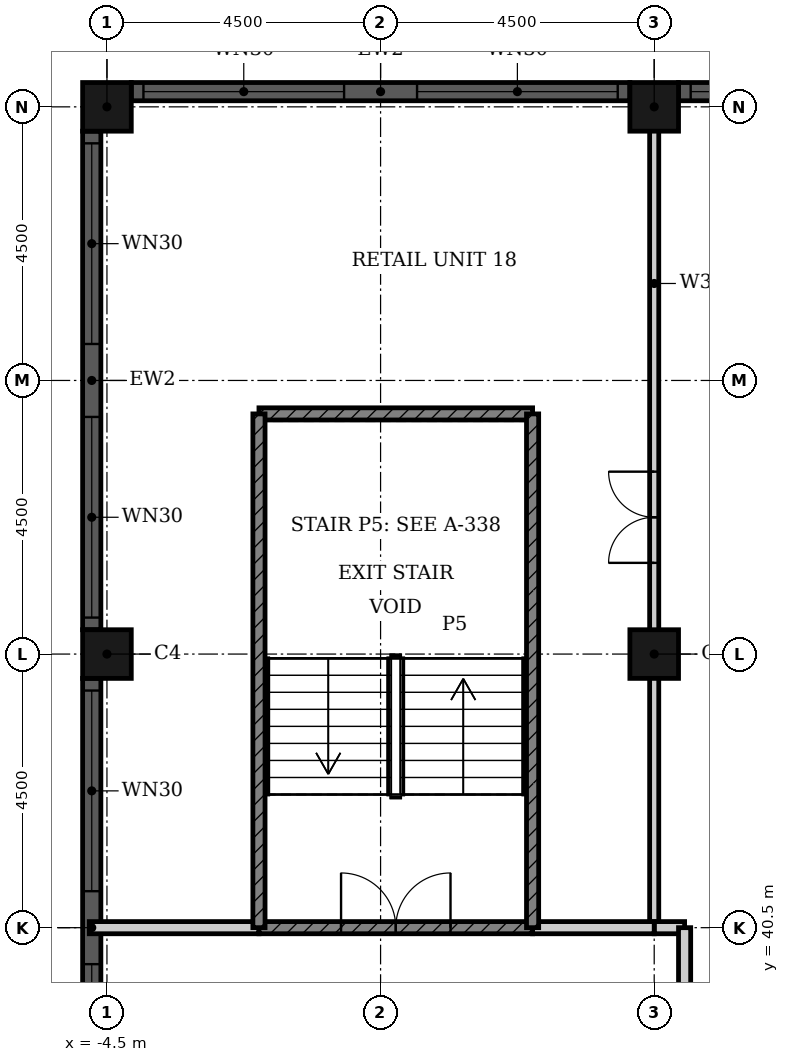
"""IFC4 building model, lengths in metres.
Left out: names, types, materials, properties, quantities, classifications, styles, units other than length and angle.
Written with IfcOpenShell. Run it as: python <this file> out.ifc"""

import sys

from ifc_helpers import new_model, si_unit, direction, frame, frame_2d, origin, origin_2d, place, context, subcontext, project, spatial, rectangle, hollow_rectangle, extrude, element, fill, save


model = new_model("IFC4")
c1 = context("Model", 3, precision=1e-05, world=origin(), true_north=direction((0.0, 1.0)))
c2 = subcontext(c1, "Body", "Model", "MODEL_VIEW")
j1 = project(units=[si_unit("LENGTHUNIT", "METRE"), si_unit("PLANEANGLEUNIT", "RADIAN")], contexts=[c1])
p1 = place(None, origin())
s1 = spatial("IfcSite", under=j1, at=p1, CompositionType="ELEMENT")
p2 = place(p1, origin())
s2 = spatial("IfcBuilding", under=s1, at=p2, CompositionType="ELEMENT")
p3 = place(p2, frame((0.0, 0.0, 6.6)))
s3 = spatial("IfcBuildingStorey", under=s2, at=p3, CompositionType="ELEMENT", Elevation=6.6)
for number, where, z_axis, x_axis in (
    (1, (-4.5, 45.0, 0.0), (0.0, 0.0, 1.0), (1.0, 0.0, 0.0)),
    (2, (-4.5, 54.0, 0.0), (0.0, 0.0, 1.0), (1.0, 0.0, 0.0)),
    (3, (4.5, 54.0, 0.0), (0.0, 0.0, 1.0), (1.0, 0.0, 0.0)),
    (4, (4.5, 45.0, 0.0), (0.0, 0.0, 1.0), (1.0, 0.0, 0.0)),
):
    element("IfcColumn", number, at=place(p3, frame(where, z_axis=z_axis, x_axis=x_axis)), inside=s3, PredefinedType="COLUMN", context=c2, shape_type="SweptSolid", body=[
        extrude(hollow_rectangle(XDim=0.8, YDim=0.8, WallThickness=0.025, at=origin_2d()), origin(), (0.0, 0.0, 1.0), 5.4),
    ])
p4 = place(p3, frame((13.1, 54.25, 0.0), z_axis=(0.0, 0.0, 1.0), x_axis=(-1.0, 0.0, 0.0)))
e5 = element("IfcWall", 5, at=p4, inside=s3, PredefinedType="SOLIDWALL", context=c2, shape_type="SweptSolid", body=[
    extrude(rectangle(XDim=8.2, YDim=0.3, at=frame_2d((4.1, 0.0))), origin(), (0.0, 0.0, 1.0), 5.4),
])
p5 = place(p4, frame((0.2, 0.0, 0.9)))
e6 = element("IfcOpeningElement", 6, at=p5, cuts=e5, PredefinedType="OPENING", context=c2, shape_type="SweptSolid", body=[
    extrude(rectangle(XDim=3.3, YDim=3.5, at=frame_2d((1.65, 1.75))), frame((0.0, 0.16, 0.0), z_axis=(0.0, -1.0, 0.0), x_axis=(1.0, 0.0, 0.0)), (0.0, 0.0, 1.0), 0.32),
])
p6 = place(p4, frame((4.7, 0.0, 0.9)))
e7 = element("IfcOpeningElement", 7, at=p6, cuts=e5, PredefinedType="OPENING", context=c2, shape_type="SweptSolid", body=[
    extrude(rectangle(XDim=3.3, YDim=3.5, at=frame_2d((1.65, 1.75))), frame((0.0, 0.16, 0.0), z_axis=(0.0, -1.0, 0.0), x_axis=(1.0, 0.0, 0.0)), (0.0, 0.0, 1.0), 0.32),
])
p7 = place(p3, frame((4.1, 54.25, 0.0), z_axis=(0.0, 0.0, 1.0), x_axis=(-1.0, 0.0, 0.0)))
e8 = element("IfcWall", 8, at=p7, inside=s3, PredefinedType="SOLIDWALL", context=c2, shape_type="SweptSolid", body=[
    extrude(rectangle(XDim=8.2, YDim=0.3, at=frame_2d((4.1, 0.0))), origin(), (0.0, 0.0, 1.0), 5.4),
])
p8 = place(p7, frame((0.2, 0.0, 0.9)))
e9 = element("IfcOpeningElement", 9, at=p8, cuts=e8, PredefinedType="OPENING", context=c2, shape_type="SweptSolid", body=[
    extrude(rectangle(XDim=3.3, YDim=3.5, at=frame_2d((1.65, 1.75))), frame((0.0, 0.16, 0.0), z_axis=(0.0, -1.0, 0.0), x_axis=(1.0, 0.0, 0.0)), (0.0, 0.0, 1.0), 0.32),
])
p9 = place(p7, frame((4.7, 0.0, 0.9)))
e10 = element("IfcOpeningElement", 10, at=p9, cuts=e8, PredefinedType="OPENING", context=c2, shape_type="SweptSolid", body=[
    extrude(rectangle(XDim=3.3, YDim=3.5, at=frame_2d((1.65, 1.75))), frame((0.0, 0.16, 0.0), z_axis=(0.0, -1.0, 0.0), x_axis=(1.0, 0.0, 0.0)), (0.0, 0.0, 1.0), 0.32),
])
p10 = place(p3, frame((-4.75, 53.6, 0.0), z_axis=(0.0, 0.0, 1.0), x_axis=(0.0, -1.0, 0.0)))
e11 = element("IfcWall", 11, at=p10, inside=s3, PredefinedType="SOLIDWALL", context=c2, shape_type="SweptSolid", body=[
    extrude(rectangle(XDim=8.2, YDim=0.3, at=frame_2d((4.1, 0.0))), origin(), (0.0, 0.0, 1.0), 5.4),
])
p11 = place(p10, frame((0.2, 0.0, 0.9)))
e12 = element("IfcOpeningElement", 12, at=p11, cuts=e11, PredefinedType="OPENING", context=c2, shape_type="SweptSolid", body=[
    extrude(rectangle(XDim=3.3, YDim=3.5, at=frame_2d((1.65, 1.75))), frame((0.0, 0.16, 0.0), z_axis=(0.0, -1.0, 0.0), x_axis=(1.0, 0.0, 0.0)), (0.0, 0.0, 1.0), 0.32),
])
p12 = place(p10, frame((4.7, 0.0, 0.9)))
e13 = element("IfcOpeningElement", 13, at=p12, cuts=e11, PredefinedType="OPENING", context=c2, shape_type="SweptSolid", body=[
    extrude(rectangle(XDim=3.3, YDim=3.5, at=frame_2d((1.65, 1.75))), frame((0.0, 0.16, 0.0), z_axis=(0.0, -1.0, 0.0), x_axis=(1.0, 0.0, 0.0)), (0.0, 0.0, 1.0), 0.32),
])
p13 = place(p3, frame((-4.75, 44.6, 0.0), z_axis=(0.0, 0.0, 1.0), x_axis=(0.0, -1.0, 0.0)))
e14 = element("IfcWall", 14, at=p13, inside=s3, PredefinedType="SOLIDWALL", context=c2, shape_type="SweptSolid", body=[
    extrude(rectangle(XDim=8.2, YDim=0.3, at=frame_2d((4.1, 0.0))), origin(), (0.0, 0.0, 1.0), 5.4),
])
p14 = place(p13, frame((0.2, 0.0, 0.9)))
e15 = element("IfcOpeningElement", 15, at=p14, cuts=e14, PredefinedType="OPENING", context=c2, shape_type="SweptSolid", body=[
    extrude(rectangle(XDim=3.3, YDim=3.5, at=frame_2d((1.65, 1.75))), frame((0.0, 0.16, 0.0), z_axis=(0.0, -1.0, 0.0), x_axis=(1.0, 0.0, 0.0)), (0.0, 0.0, 1.0), 0.32),
])
p15 = place(p13, frame((4.7, 0.0, 0.9)))
e16 = element("IfcOpeningElement", 16, at=p15, cuts=e14, PredefinedType="OPENING", context=c2, shape_type="SweptSolid", body=[
    extrude(rectangle(XDim=3.3, YDim=3.5, at=frame_2d((1.65, 1.75))), frame((0.0, 0.16, 0.0), z_axis=(0.0, -1.0, 0.0), x_axis=(1.0, 0.0, 0.0)), (0.0, 0.0, 1.0), 0.32),
])
p16 = place(p3, frame((4.5, 40.5, 0.0), z_axis=(0.0, 0.0, 1.0), x_axis=(0.0, 1.0, 0.0)))
e17 = element("IfcWall", 17, at=p16, inside=s3, PredefinedType="PARTITIONING", context=c2, shape_type="SweptSolid", body=[
    extrude(rectangle(XDim=13.69, YDim=0.15, at=frame_2d((6.845, 0.0))), origin(), (0.0, 0.0, 1.0), 5.05),
])
p17 = place(p16, frame((6.0, 0.0, 0.0)))
e18 = element("IfcOpeningElement", 18, at=p17, cuts=e17, PredefinedType="OPENING", context=c2, shape_type="SweptSolid", body=[
    extrude(rectangle(XDim=1.5, YDim=2.4, at=frame_2d((0.75, 1.2))), frame((0.0, 0.085, 0.0), z_axis=(0.0, -1.0, 0.0), x_axis=(1.0, 0.0, 0.0)), (0.0, 0.0, 1.0), 0.17),
])
p18 = place(p3, frame((4.5, 40.5, 0.0), z_axis=(0.0, 0.0, 1.0), x_axis=(1.0, 0.0, 0.0)))
e19 = element("IfcWall", 19, at=p18, inside=s3, PredefinedType="PARTITIONING", context=c2, shape_type="SweptSolid", body=[
    extrude(rectangle(XDim=0.5, YDim=0.2, at=frame_2d((0.25, 0.0))), origin(), (0.0, 0.0, 1.0), 5.05),
])
p19 = place(p3, frame((-4.79, 40.5, 0.0), z_axis=(0.0, 0.0, 1.0), x_axis=(1.0, 0.0, 0.0)))
e20 = element("IfcWall", 20, at=p19, inside=s3, PredefinedType="PARTITIONING", context=c2, shape_type="SweptSolid", body=[
    extrude(rectangle(XDim=2.79, YDim=0.2, at=frame_2d((1.395, 0.0))), origin(), (0.0, 0.0, 1.0), 5.05),
])
p20 = place(p3, frame((2.5, 40.5, 0.0), z_axis=(0.0, 0.0, 1.0), x_axis=(1.0, 0.0, 0.0)))
e21 = element("IfcWall", 21, at=p20, inside=s3, PredefinedType="PARTITIONING", context=c2, shape_type="SweptSolid", body=[
    extrude(rectangle(XDim=2.0, YDim=0.2, at=frame_2d((1.0, 0.0))), origin(), (0.0, 0.0, 1.0), 5.05),
])
p21 = place(p3, frame((5.0, 37.5, 0.0), z_axis=(0.0, 0.0, 1.0), x_axis=(0.0, 1.0, 0.0)))
e22 = element("IfcWall", 22, at=p21, inside=s3, PredefinedType="PARTITIONING", context=c2, shape_type="SweptSolid", body=[
    extrude(rectangle(XDim=3.0, YDim=0.2, at=frame_2d((1.5, 0.0))), origin(), (0.0, 0.0, 1.0), 5.05),
])
p22 = place(p3, frame((-2.0, 40.5, 0.0), z_axis=(0.0, 0.0, 1.0), x_axis=(1.0, 0.0, 0.0)))
e23 = element("IfcWall", 23, at=p22, inside=s3, PredefinedType="SHEAR", context=c2, shape_type="SweptSolid", body=[
    extrude(rectangle(XDim=4.5, YDim=0.2, at=frame_2d((2.25, 0.0))), origin(), (0.0, 0.0, 1.0), 5.05),
])
p23 = place(p22, frame((1.35, 0.0, 0.0)))
e24 = element("IfcOpeningElement", 24, at=p23, cuts=e23, PredefinedType="OPENING", context=c2, shape_type="SweptSolid", body=[
    extrude(rectangle(XDim=1.8, YDim=2.1, at=frame_2d((0.9, 1.05))), frame((0.0, 0.11, 0.0), z_axis=(0.0, -1.0, 0.0), x_axis=(1.0, 0.0, 0.0)), (0.0, 0.0, 1.0), 0.22),
])
p24 = place(p3, frame((-2.0, 48.95, 0.0), z_axis=(0.0, 0.0, 1.0), x_axis=(1.0, 0.0, 0.0)))
e25 = element("IfcWall", 25, at=p24, inside=s3, PredefinedType="SHEAR", context=c2, shape_type="SweptSolid", body=[
    extrude(rectangle(XDim=4.5, YDim=0.2, at=frame_2d((2.25, 0.0))), origin(), (0.0, 0.0, 1.0), 5.05),
])
for number, where, z_axis, x_axis in (
    (26, (-2.0, 40.5, 0.0), (0.0, 0.0, 1.0), (0.0, 1.0, 0.0)),
    (27, (2.5, 40.5, 0.0), (0.0, 0.0, 1.0), (0.0, 1.0, 0.0)),
):
    element("IfcWall", number, at=place(p3, frame(where, z_axis=z_axis, x_axis=x_axis)), inside=s3, PredefinedType="SHEAR", context=c2, shape_type="SweptSolid", body=[
        extrude(rectangle(XDim=8.45, YDim=0.2, at=frame_2d((4.225, 0.0))), origin(), (0.0, 0.0, 1.0), 5.05),
    ])
p25 = place(p6, origin())
e28 = element("IfcWindow", 28, at=p25, inside=s3, PartitioningType="SINGLE_PANEL", PredefinedType="WINDOW", context=c2, shape_type="SweptSolid", body=[
    extrude(rectangle(XDim=3.3, YDim=3.5, at=frame_2d((1.65, 1.75))), frame((0.0, 0.03, 0.0), z_axis=(0.0, -1.0, 0.0), x_axis=(1.0, 0.0, 0.0)), (0.0, 0.0, 1.0), 0.06),
])
fill(e7, e28)
p26 = place(p8, origin())
e29 = element("IfcWindow", 29, at=p26, inside=s3, PartitioningType="SINGLE_PANEL", PredefinedType="WINDOW", context=c2, shape_type="SweptSolid", body=[
    extrude(rectangle(XDim=3.3, YDim=3.5, at=frame_2d((1.65, 1.75))), frame((0.0, 0.03, 0.0), z_axis=(0.0, -1.0, 0.0), x_axis=(1.0, 0.0, 0.0)), (0.0, 0.0, 1.0), 0.06),
])
fill(e9, e29)
p27 = place(p9, origin())
e30 = element("IfcWindow", 30, at=p27, inside=s3, PartitioningType="SINGLE_PANEL", PredefinedType="WINDOW", context=c2, shape_type="SweptSolid", body=[
    extrude(rectangle(XDim=3.3, YDim=3.5, at=frame_2d((1.65, 1.75))), frame((0.0, 0.03, 0.0), z_axis=(0.0, -1.0, 0.0), x_axis=(1.0, 0.0, 0.0)), (0.0, 0.0, 1.0), 0.06),
])
fill(e10, e30)
p28 = place(p11, origin())
e31 = element("IfcWindow", 31, at=p28, inside=s3, PartitioningType="SINGLE_PANEL", PredefinedType="WINDOW", context=c2, shape_type="SweptSolid", body=[
    extrude(rectangle(XDim=3.3, YDim=3.5, at=frame_2d((1.65, 1.75))), frame((0.0, 0.03, 0.0), z_axis=(0.0, -1.0, 0.0), x_axis=(1.0, 0.0, 0.0)), (0.0, 0.0, 1.0), 0.06),
])
fill(e12, e31)
p29 = place(p12, origin())
e32 = element("IfcWindow", 32, at=p29, inside=s3, PartitioningType="SINGLE_PANEL", PredefinedType="WINDOW", context=c2, shape_type="SweptSolid", body=[
    extrude(rectangle(XDim=3.3, YDim=3.5, at=frame_2d((1.65, 1.75))), frame((0.0, 0.03, 0.0), z_axis=(0.0, -1.0, 0.0), x_axis=(1.0, 0.0, 0.0)), (0.0, 0.0, 1.0), 0.06),
])
fill(e13, e32)
p30 = place(p14, origin())
e33 = element("IfcWindow", 33, at=p30, inside=s3, PartitioningType="SINGLE_PANEL", PredefinedType="WINDOW", context=c2, shape_type="SweptSolid", body=[
    extrude(rectangle(XDim=3.3, YDim=3.5, at=frame_2d((1.65, 1.75))), frame((0.0, 0.03, 0.0), z_axis=(0.0, -1.0, 0.0), x_axis=(1.0, 0.0, 0.0)), (0.0, 0.0, 1.0), 0.06),
])
fill(e15, e33)
p31 = place(p15, origin())
e34 = element("IfcWindow", 34, at=p31, inside=s3, PartitioningType="SINGLE_PANEL", PredefinedType="WINDOW", context=c2, shape_type="SweptSolid", body=[
    extrude(rectangle(XDim=3.3, YDim=3.5, at=frame_2d((1.65, 1.75))), frame((0.0, 0.03, 0.0), z_axis=(0.0, -1.0, 0.0), x_axis=(1.0, 0.0, 0.0)), (0.0, 0.0, 1.0), 0.06),
])
fill(e16, e34)
p32 = place(p23, origin())
e35 = element("IfcDoor", 35, at=p32, inside=s3, OperationType="DOUBLE_DOOR_SINGLE_SWING", PredefinedType="DOOR", context=c2, shape_type="SweptSolid", body=[
    extrude(rectangle(XDim=1.8, YDim=2.1, at=frame_2d((0.9, 1.05))), frame((0.0, 0.025, 0.0), z_axis=(0.0, -1.0, 0.0), x_axis=(1.0, 0.0, 0.0)), (0.0, 0.0, 1.0), 0.05),
])
fill(e24, e35)
p33 = place(p17, origin())
e36 = element("IfcDoor", 36, at=p33, inside=s3, OperationType="DOUBLE_DOOR_SINGLE_SWING", PredefinedType="DOOR", context=c2, shape_type="SweptSolid", body=[
    extrude(rectangle(XDim=1.5, YDim=2.4, at=frame_2d((0.75, 1.2))), frame((0.0, 0.025, 0.0), z_axis=(0.0, -1.0, 0.0), x_axis=(1.0, 0.0, 0.0)), (0.0, 0.0, 1.0), 0.05),
])
fill(e18, e36)
save(model, sys.argv[1])
